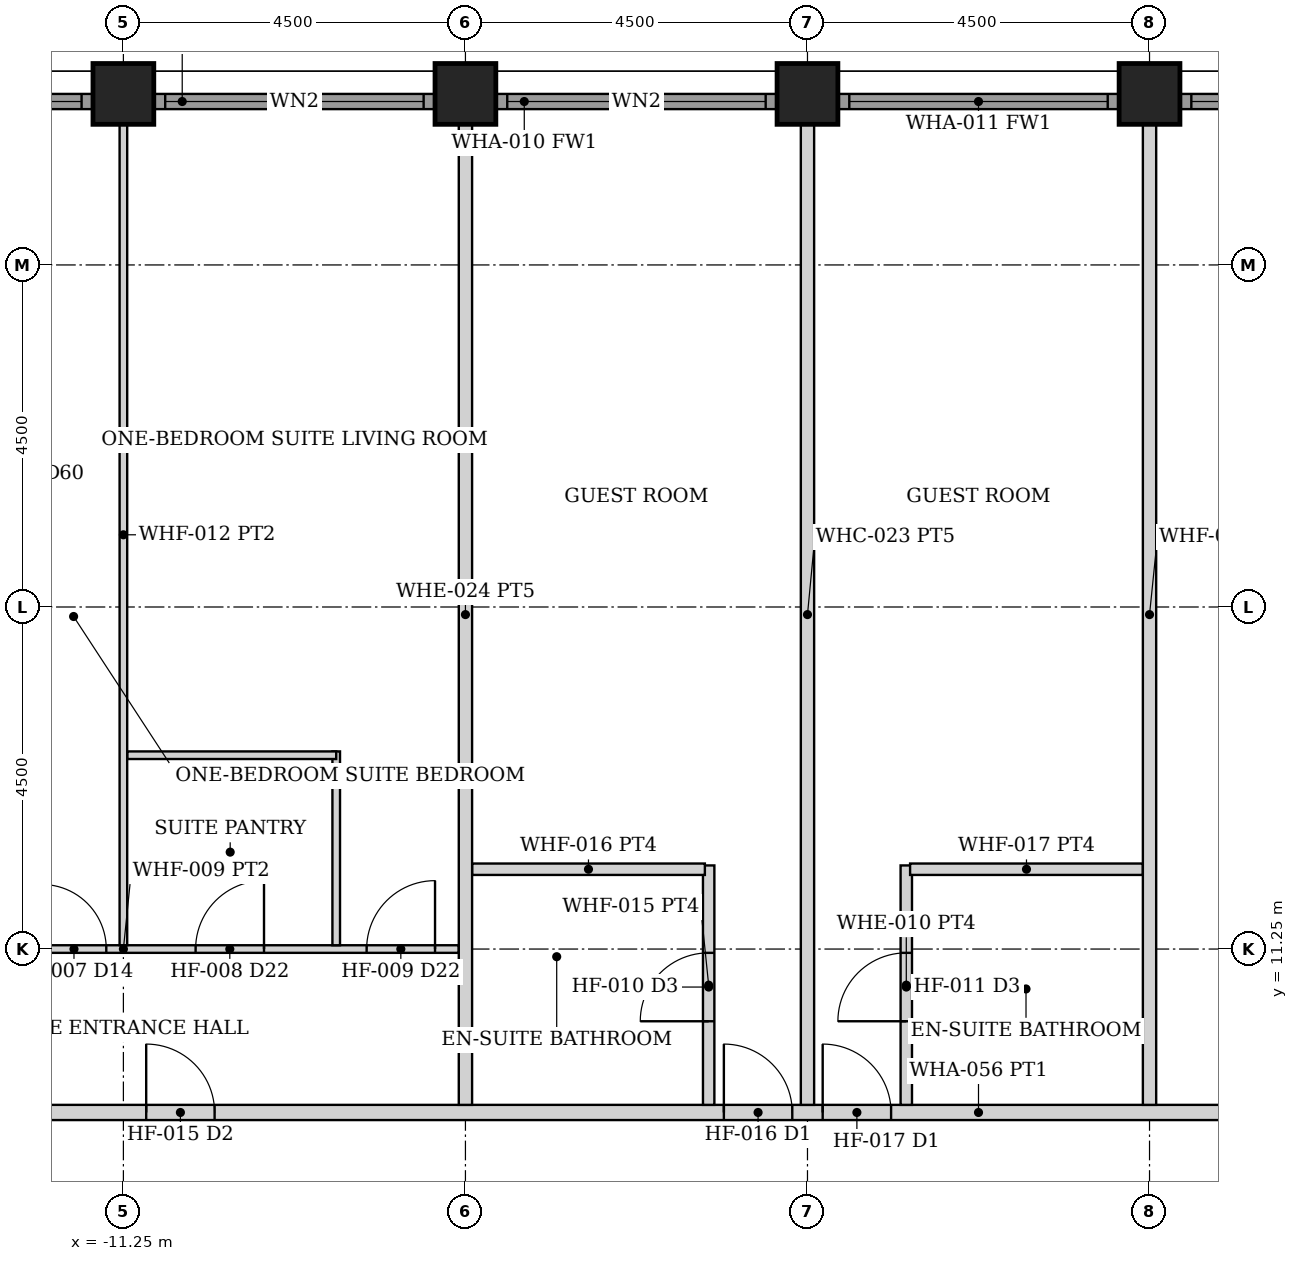
"""IFC4 building model, lengths in metres.
Left out: names, types, materials, properties, quantities, classifications, styles, units other than length and angle.
Written with IfcOpenShell. Run it as: python <this file> out.ifc"""

import sys

from ifc_helpers import new_model, si_unit, direction, frame, frame_2d, origin, origin_2d, place, context, subcontext, project, spatial, rectangle, hollow_rectangle, extrude, element, fill, save


model = new_model("IFC4")
c1 = context("Model", 3, precision=1e-05, world=origin(), true_north=direction((0.0, 1.0)))
c2 = subcontext(c1, "Body", "Model", "MODEL_VIEW")
j1 = project(units=[si_unit("LENGTHUNIT", "METRE"), si_unit("PLANEANGLEUNIT", "RADIAN")], contexts=[c1])
p1 = place(None, origin())
s1 = spatial("IfcSite", under=j1, at=p1, CompositionType="ELEMENT")
p2 = place(p1, origin())
s2 = spatial("IfcBuilding", under=s1, at=p2, CompositionType="ELEMENT")
p3 = place(p2, frame((0.0, 0.0, 172.4)))
s3 = spatial("IfcBuildingStorey", under=s2, at=p3, CompositionType="ELEMENT", Elevation=172.4)
for number, where, z_axis, x_axis in (
    (1, (-11.25, 22.5, 0.0), (0.0, 0.0, 1.0), (0.0, 1.0, 0.0)),
    (2, (-6.75, 22.5, 0.0), (0.0, 0.0, 1.0), (0.0, 1.0, 0.0)),
    (3, (-2.25, 22.5, 0.0), (0.0, 0.0, 1.0), (0.0, 1.0, 0.0)),
    (4, (2.25, 22.5, 0.0), (0.0, 0.0, 1.0), (0.0, 1.0, 0.0)),
):
    element("IfcColumn", number, at=place(p3, frame(where, z_axis=z_axis, x_axis=x_axis)), inside=s3, PredefinedType="COLUMN", context=c2, shape_type="SweptSolid", body=[
        extrude(hollow_rectangle(XDim=0.8, YDim=0.8, WallThickness=0.045, at=origin_2d()), origin(), (0.0, 0.0, 1.0), 3.6),
    ])
p4 = place(p3, frame((-15.345, 22.4, 0.0), z_axis=(0.0, 0.0, 1.0), x_axis=(1.0, 0.0, 0.0)))
e5 = element("IfcWall", 5, at=p4, inside=s3, PredefinedType="SOLIDWALL", context=c2, shape_type="SweptSolid", body=[
    extrude(rectangle(XDim=3.69, YDim=0.2, at=frame_2d((1.845, 0.0))), origin(), (0.0, 0.0, 1.0), 2.479),
])
p5 = place(p4, frame((0.145, 0.0, 0.3)))
e6 = element("IfcOpeningElement", 6, at=p5, cuts=e5, PredefinedType="OPENING", context=c2, shape_type="SweptSolid", body=[
    extrude(rectangle(XDim=3.4, YDim=2.029, at=frame_2d((1.7, 1.015))), frame((0.0, 0.11, 0.0), z_axis=(0.0, -1.0, 0.0), x_axis=(1.0, 0.0, 0.0)), (0.0, 0.0, 1.0), 0.22),
])
p6 = place(p3, frame((-10.845, 22.4, 0.0), z_axis=(0.0, 0.0, 1.0), x_axis=(1.0, 0.0, 0.0)))
e7 = element("IfcWall", 7, at=p6, inside=s3, PredefinedType="SOLIDWALL", context=c2, shape_type="SweptSolid", body=[
    extrude(rectangle(XDim=3.69, YDim=0.2, at=frame_2d((1.845, 0.0))), origin(), (0.0, 0.0, 1.0), 2.479),
])
p7 = place(p6, frame((0.145, 0.0, 0.3)))
e8 = element("IfcOpeningElement", 8, at=p7, cuts=e7, PredefinedType="OPENING", context=c2, shape_type="SweptSolid", body=[
    extrude(rectangle(XDim=3.4, YDim=2.029, at=frame_2d((1.7, 1.015))), frame((0.0, 0.11, 0.0), z_axis=(0.0, -1.0, 0.0), x_axis=(1.0, 0.0, 0.0)), (0.0, 0.0, 1.0), 0.22),
])
p8 = place(p3, frame((-6.345, 22.4, 0.0), z_axis=(0.0, 0.0, 1.0), x_axis=(1.0, 0.0, 0.0)))
e9 = element("IfcWall", 9, at=p8, inside=s3, PredefinedType="SOLIDWALL", context=c2, shape_type="SweptSolid", body=[
    extrude(rectangle(XDim=3.69, YDim=0.2, at=frame_2d((1.845, 0.0))), origin(), (0.0, 0.0, 1.0), 2.479),
])
p9 = place(p8, frame((0.145, 0.0, 0.3)))
e10 = element("IfcOpeningElement", 10, at=p9, cuts=e9, PredefinedType="OPENING", context=c2, shape_type="SweptSolid", body=[
    extrude(rectangle(XDim=3.4, YDim=2.029, at=frame_2d((1.7, 1.015))), frame((0.0, 0.11, 0.0), z_axis=(0.0, -1.0, 0.0), x_axis=(1.0, 0.0, 0.0)), (0.0, 0.0, 1.0), 0.22),
])
p10 = place(p3, frame((-1.845, 22.4, 0.0), z_axis=(0.0, 0.0, 1.0), x_axis=(1.0, 0.0, 0.0)))
e11 = element("IfcWall", 11, at=p10, inside=s3, PredefinedType="SOLIDWALL", context=c2, shape_type="SweptSolid", body=[
    extrude(rectangle(XDim=3.69, YDim=0.2, at=frame_2d((1.845, 0.0))), origin(), (0.0, 0.0, 1.0), 2.479),
])
p11 = place(p10, frame((0.145, 0.0, 0.3)))
e12 = element("IfcOpeningElement", 12, at=p11, cuts=e11, PredefinedType="OPENING", context=c2, shape_type="SweptSolid", body=[
    extrude(rectangle(XDim=3.4, YDim=2.029, at=frame_2d((1.7, 1.015))), frame((0.0, 0.11, 0.0), z_axis=(0.0, -1.0, 0.0), x_axis=(1.0, 0.0, 0.0)), (0.0, 0.0, 1.0), 0.22),
])
p12 = place(p3, frame((2.655, 22.4, 0.0), z_axis=(0.0, 0.0, 1.0), x_axis=(1.0, 0.0, 0.0)))
e13 = element("IfcWall", 13, at=p12, inside=s3, PredefinedType="SOLIDWALL", context=c2, shape_type="SweptSolid", body=[
    extrude(rectangle(XDim=3.69, YDim=0.2, at=frame_2d((1.845, 0.0))), origin(), (0.0, 0.0, 1.0), 2.479),
])
p13 = place(p12, frame((0.145, 0.0, 0.3)))
e14 = element("IfcOpeningElement", 14, at=p13, cuts=e13, PredefinedType="OPENING", context=c2, shape_type="SweptSolid", body=[
    extrude(rectangle(XDim=3.4, YDim=2.029, at=frame_2d((1.7, 1.015))), frame((0.0, 0.11, 0.0), z_axis=(0.0, -1.0, 0.0), x_axis=(1.0, 0.0, 0.0)), (0.0, 0.0, 1.0), 0.22),
])
p14 = place(p3, frame((-22.3, 9.1, 0.0), z_axis=(0.0, 0.0, 1.0), x_axis=(1.0, 0.0, 0.0)))
e15 = element("IfcWall", 15, at=p14, inside=s3, PredefinedType="PARTITIONING", context=c2, shape_type="SweptSolid", body=[
    extrude(rectangle(XDim=44.6, YDim=0.2, at=frame_2d((22.3, 0.0))), origin(), (0.0, 0.0, 1.0), 2.473),
])
p15 = place(p14, frame((11.35, 0.0, 0.0)))
e16 = element("IfcOpeningElement", 16, at=p15, cuts=e15, PredefinedType="OPENING", context=c2, shape_type="SweptSolid", body=[
    extrude(rectangle(XDim=0.9, YDim=2.1, at=frame_2d((0.45, 1.05))), frame((0.0, 0.11, 0.0), z_axis=(0.0, -1.0, 0.0), x_axis=(1.0, 0.0, 0.0)), (0.0, 0.0, 1.0), 0.22),
])
p16 = place(p14, frame((18.95, 0.0, 0.0)))
e17 = element("IfcOpeningElement", 17, at=p16, cuts=e15, PredefinedType="OPENING", context=c2, shape_type="SweptSolid", body=[
    extrude(rectangle(XDim=0.9, YDim=2.1, at=frame_2d((0.45, 1.05))), frame((0.0, 0.11, 0.0), z_axis=(0.0, -1.0, 0.0), x_axis=(1.0, 0.0, 0.0)), (0.0, 0.0, 1.0), 0.22),
])
p17 = place(p14, frame((20.25, 0.0, 0.0)))
e18 = element("IfcOpeningElement", 18, at=p17, cuts=e15, PredefinedType="OPENING", context=c2, shape_type="SweptSolid", body=[
    extrude(rectangle(XDim=0.9, YDim=2.1, at=frame_2d((0.45, 1.05))), frame((0.0, 0.11, 0.0), z_axis=(0.0, -1.0, 0.0), x_axis=(1.0, 0.0, 0.0)), (0.0, 0.0, 1.0), 0.22),
])
p18 = place(p14, frame((32.45, 0.0, 0.0)))
e19 = element("IfcOpeningElement", 19, at=p18, cuts=e15, PredefinedType="OPENING", context=c2, shape_type="SweptSolid", body=[
    extrude(rectangle(XDim=0.9, YDim=2.1, at=frame_2d((0.45, 1.05))), frame((0.0, 0.11, 0.0), z_axis=(0.0, -1.0, 0.0), x_axis=(1.0, 0.0, 0.0)), (0.0, 0.0, 1.0), 0.22),
])
p19 = place(p14, frame((36.95, 0.0, 0.0)))
e20 = element("IfcOpeningElement", 20, at=p19, cuts=e15, PredefinedType="OPENING", context=c2, shape_type="SweptSolid", body=[
    extrude(rectangle(XDim=0.9, YDim=2.1, at=frame_2d((0.45, 1.05))), frame((0.0, 0.11, 0.0), z_axis=(0.0, -1.0, 0.0), x_axis=(1.0, 0.0, 0.0)), (0.0, 0.0, 1.0), 0.22),
])
p20 = place(p14, frame((38.85, 0.0, 0.0)))
e21 = element("IfcOpeningElement", 21, at=p20, cuts=e15, PredefinedType="OPENING", context=c2, shape_type="SweptSolid", body=[
    extrude(rectangle(XDim=0.9, YDim=2.1, at=frame_2d((0.45, 1.05))), frame((0.0, 0.11, 0.0), z_axis=(0.0, -1.0, 0.0), x_axis=(1.0, 0.0, 0.0)), (0.0, 0.0, 1.0), 0.22),
])
p21 = place(p14, frame((4.85, 0.0, 0.0)))
e22 = element("IfcOpeningElement", 22, at=p21, cuts=e15, PredefinedType="OPENING", context=c2, shape_type="SweptSolid", body=[
    extrude(rectangle(XDim=0.9, YDim=2.1, at=frame_2d((0.45, 1.05))), frame((0.0, 0.11, 0.0), z_axis=(0.0, -1.0, 0.0), x_axis=(1.0, 0.0, 0.0)), (0.0, 0.0, 1.0), 0.22),
])
p22 = place(p3, frame((-15.663, 11.25, 0.0), z_axis=(0.0, 0.0, 1.0), x_axis=(1.0, 0.0, 0.0)))
e23 = element("IfcWall", 23, at=p22, inside=s3, PredefinedType="PARTITIONING", context=c2, shape_type="SweptSolid", body=[
    extrude(rectangle(XDim=8.825, YDim=0.1, at=frame_2d((4.413, 0.0))), origin(), (0.0, 0.0, 1.0), 2.473),
])
p23 = place(p22, frame((5.363, 0.0, 0.0)))
e24 = element("IfcOpeningElement", 24, at=p23, cuts=e23, PredefinedType="OPENING", context=c2, shape_type="SweptSolid", body=[
    extrude(rectangle(XDim=0.9, YDim=2.1, at=frame_2d((0.45, 1.05))), frame((0.0, 0.06, 0.0), z_axis=(0.0, -1.0, 0.0), x_axis=(1.0, 0.0, 0.0)), (0.0, 0.0, 1.0), 0.12),
])
p24 = place(p22, frame((7.613, 0.0, 0.0)))
e25 = element("IfcOpeningElement", 25, at=p24, cuts=e23, PredefinedType="OPENING", context=c2, shape_type="SweptSolid", body=[
    extrude(rectangle(XDim=0.9, YDim=2.1, at=frame_2d((0.45, 1.05))), frame((0.0, 0.06, 0.0), z_axis=(0.0, -1.0, 0.0), x_axis=(1.0, 0.0, 0.0)), (0.0, 0.0, 1.0), 0.12),
])
p25 = place(p22, frame((3.337, 0.0, 0.0)))
e26 = element("IfcOpeningElement", 26, at=p25, cuts=e23, PredefinedType="OPENING", context=c2, shape_type="SweptSolid", body=[
    extrude(rectangle(XDim=0.85, YDim=2.1, at=frame_2d((0.425, 1.05))), frame((0.0, 0.06, 0.0), z_axis=(0.0, -1.0, 0.0), x_axis=(1.0, 0.0, 0.0)), (0.0, 0.0, 1.0), 0.12),
])
p26 = place(p3, frame((-8.45, 11.3, 0.0), z_axis=(0.0, 0.0, 1.0), x_axis=(0.0, 1.0, 0.0)))
e27 = element("IfcWall", 27, at=p26, inside=s3, PredefinedType="PARTITIONING", context=c2, shape_type="SweptSolid", body=[
    extrude(rectangle(XDim=2.55, YDim=0.1, at=frame_2d((1.275, 0.0))), origin(), (0.0, 0.0, 1.0), 2.473),
])
p27 = place(p3, frame((-11.2, 13.8, 0.0), z_axis=(0.0, 0.0, 1.0), x_axis=(1.0, 0.0, 0.0)))
e28 = element("IfcWall", 28, at=p27, inside=s3, PredefinedType="PARTITIONING", context=c2, shape_type="SweptSolid", body=[
    extrude(rectangle(XDim=2.75, YDim=0.1, at=frame_2d((1.375, 0.0))), origin(), (0.0, 0.0, 1.0), 2.473),
])
p28 = place(p3, frame((-11.25, 11.3, 0.0), z_axis=(0.0, 0.0, 1.0), x_axis=(0.0, 1.0, 0.0)))
e29 = element("IfcWall", 29, at=p28, inside=s3, PredefinedType="PARTITIONING", context=c2, shape_type="SweptSolid", body=[
    extrude(rectangle(XDim=10.8, YDim=0.1, at=frame_2d((5.4, 0.0))), origin(), (0.0, 0.0, 1.0), 2.473),
])
p29 = place(p3, frame((-3.55, 9.2, 0.0), z_axis=(0.0, 0.0, 1.0), x_axis=(0.0, 1.0, 0.0)))
e30 = element("IfcWall", 30, at=p29, inside=s3, PredefinedType="PARTITIONING", context=c2, shape_type="SweptSolid", body=[
    extrude(rectangle(XDim=3.15, YDim=0.15, at=frame_2d((1.575, 0.0))), origin(), (0.0, 0.0, 1.0), 2.473),
])
p30 = place(p29, frame((1.1, 0.0, 0.0)))
e31 = element("IfcOpeningElement", 31, at=p30, cuts=e30, PredefinedType="OPENING", context=c2, shape_type="SweptSolid", body=[
    extrude(rectangle(XDim=0.9, YDim=2.1, at=frame_2d((0.45, 1.05))), frame((0.0, 0.085, 0.0), z_axis=(0.0, -1.0, 0.0), x_axis=(1.0, 0.0, 0.0)), (0.0, 0.0, 1.0), 0.17),
])
p31 = place(p3, frame((-6.663, 12.3, 0.0), z_axis=(0.0, 0.0, 1.0), x_axis=(1.0, 0.0, 0.0)))
e32 = element("IfcWall", 32, at=p31, inside=s3, PredefinedType="PARTITIONING", context=c2, shape_type="SweptSolid", body=[
    extrude(rectangle(XDim=3.062, YDim=0.15, at=frame_2d((1.531, 0.0))), origin(), (0.0, 0.0, 1.0), 2.473),
])
p32 = place(p3, frame((-0.95, 9.2, 0.0), z_axis=(0.0, 0.0, 1.0), x_axis=(0.0, 1.0, 0.0)))
e33 = element("IfcWall", 33, at=p32, inside=s3, PredefinedType="PARTITIONING", context=c2, shape_type="SweptSolid", body=[
    extrude(rectangle(XDim=3.15, YDim=0.15, at=frame_2d((1.575, 0.0))), origin(), (0.0, 0.0, 1.0), 2.473),
])
p33 = place(p32, frame((1.1, 0.0, 0.0)))
e34 = element("IfcOpeningElement", 34, at=p33, cuts=e33, PredefinedType="OPENING", context=c2, shape_type="SweptSolid", body=[
    extrude(rectangle(XDim=0.9, YDim=2.1, at=frame_2d((0.45, 1.05))), frame((0.0, 0.085, 0.0), z_axis=(0.0, -1.0, 0.0), x_axis=(1.0, 0.0, 0.0)), (0.0, 0.0, 1.0), 0.17),
])
p34 = place(p3, frame((-0.9, 12.3, 0.0), z_axis=(0.0, 0.0, 1.0), x_axis=(1.0, 0.0, 0.0)))
e35 = element("IfcWall", 35, at=p34, inside=s3, PredefinedType="PARTITIONING", context=c2, shape_type="SweptSolid", body=[
    extrude(rectangle(XDim=3.062, YDim=0.15, at=frame_2d((1.531, 0.0))), origin(), (0.0, 0.0, 1.0), 2.473),
])
for number, where, z_axis, x_axis in (
    (36, (-6.75, 9.2, 0.0), (0.0, 0.0, 1.0), (0.0, 1.0, 0.0)),
    (37, (-2.25, 9.2, 0.0), (0.0, 0.0, 1.0), (0.0, 1.0, 0.0)),
    (38, (2.25, 9.2, 0.0), (0.0, 0.0, 1.0), (0.0, 1.0, 0.0)),
):
    element("IfcWall", number, at=place(p3, frame(where, z_axis=z_axis, x_axis=x_axis)), inside=s3, PredefinedType="PARTITIONING", context=c2, shape_type="SweptSolid", body=[
        extrude(rectangle(XDim=12.9, YDim=0.175, at=frame_2d((6.45, 0.0))), origin(), (0.0, 0.0, 1.0), 2.473),
    ])
p35 = place(p5, origin())
e39 = element("IfcWindow", 39, at=p35, inside=s3, PartitioningType="SINGLE_PANEL", PredefinedType="WINDOW", context=c2, shape_type="SweptSolid", body=[
    extrude(rectangle(XDim=3.4, YDim=2.029, at=frame_2d((1.7, 1.015))), frame((0.0, 0.03, 0.0), z_axis=(0.0, -1.0, 0.0), x_axis=(1.0, 0.0, 0.0)), (0.0, 0.0, 1.0), 0.06),
])
fill(e6, e39)
p36 = place(p7, origin())
e40 = element("IfcWindow", 40, at=p36, inside=s3, PartitioningType="SINGLE_PANEL", PredefinedType="WINDOW", context=c2, shape_type="SweptSolid", body=[
    extrude(rectangle(XDim=3.4, YDim=2.029, at=frame_2d((1.7, 1.015))), frame((0.0, 0.03, 0.0), z_axis=(0.0, -1.0, 0.0), x_axis=(1.0, 0.0, 0.0)), (0.0, 0.0, 1.0), 0.06),
])
fill(e8, e40)
p37 = place(p9, origin())
e41 = element("IfcWindow", 41, at=p37, inside=s3, PartitioningType="SINGLE_PANEL", PredefinedType="WINDOW", context=c2, shape_type="SweptSolid", body=[
    extrude(rectangle(XDim=3.4, YDim=2.029, at=frame_2d((1.7, 1.015))), frame((0.0, 0.03, 0.0), z_axis=(0.0, -1.0, 0.0), x_axis=(1.0, 0.0, 0.0)), (0.0, 0.0, 1.0), 0.06),
])
fill(e10, e41)
p38 = place(p11, origin())
e42 = element("IfcWindow", 42, at=p38, inside=s3, PartitioningType="SINGLE_PANEL", PredefinedType="WINDOW", context=c2, shape_type="SweptSolid", body=[
    extrude(rectangle(XDim=3.4, YDim=2.029, at=frame_2d((1.7, 1.015))), frame((0.0, 0.03, 0.0), z_axis=(0.0, -1.0, 0.0), x_axis=(1.0, 0.0, 0.0)), (0.0, 0.0, 1.0), 0.06),
])
fill(e12, e42)
p39 = place(p13, origin())
e43 = element("IfcWindow", 43, at=p39, inside=s3, PartitioningType="SINGLE_PANEL", PredefinedType="WINDOW", context=c2, shape_type="SweptSolid", body=[
    extrude(rectangle(XDim=3.4, YDim=2.029, at=frame_2d((1.7, 1.015))), frame((0.0, 0.03, 0.0), z_axis=(0.0, -1.0, 0.0), x_axis=(1.0, 0.0, 0.0)), (0.0, 0.0, 1.0), 0.06),
])
fill(e14, e43)
p40 = place(p15, origin())
e44 = element("IfcDoor", 44, at=p40, inside=s3, OperationType="SINGLE_SWING_LEFT", PredefinedType="DOOR", context=c2, shape_type="SweptSolid", body=[
    extrude(rectangle(XDim=0.9, YDim=2.1, at=frame_2d((0.45, 1.05))), frame((0.0, 0.025, 0.0), z_axis=(0.0, -1.0, 0.0), x_axis=(1.0, 0.0, 0.0)), (0.0, 0.0, 1.0), 0.05),
])
fill(e16, e44)
p41 = place(p23, origin())
e45 = element("IfcDoor", 45, at=p41, inside=s3, OperationType="SINGLE_SWING_RIGHT", PredefinedType="DOOR", context=c2, shape_type="SweptSolid", body=[
    extrude(rectangle(XDim=0.9, YDim=2.1, at=frame_2d((0.45, 1.05))), frame((0.0, 0.025, 0.0), z_axis=(0.0, -1.0, 0.0), x_axis=(1.0, 0.0, 0.0)), (0.0, 0.0, 1.0), 0.05),
])
fill(e24, e45)
p42 = place(p24, origin())
e46 = element("IfcDoor", 46, at=p42, inside=s3, OperationType="SINGLE_SWING_RIGHT", PredefinedType="DOOR", context=c2, shape_type="SweptSolid", body=[
    extrude(rectangle(XDim=0.9, YDim=2.1, at=frame_2d((0.45, 1.05))), frame((0.0, 0.025, 0.0), z_axis=(0.0, -1.0, 0.0), x_axis=(1.0, 0.0, 0.0)), (0.0, 0.0, 1.0), 0.05),
])
fill(e25, e46)
p43 = place(p25, origin())
e47 = element("IfcDoor", 47, at=p43, inside=s3, OperationType="SINGLE_SWING_LEFT", PredefinedType="DOOR", context=c2, shape_type="SweptSolid", body=[
    extrude(rectangle(XDim=0.85, YDim=2.1, at=frame_2d((0.425, 1.05))), frame((0.0, 0.025, 0.0), z_axis=(0.0, -1.0, 0.0), x_axis=(1.0, 0.0, 0.0)), (0.0, 0.0, 1.0), 0.05),
])
fill(e26, e47)
p44 = place(p16, origin())
e48 = element("IfcDoor", 48, at=p44, inside=s3, OperationType="SINGLE_SWING_LEFT", PredefinedType="DOOR", context=c2, shape_type="SweptSolid", body=[
    extrude(rectangle(XDim=0.9, YDim=2.1, at=frame_2d((0.45, 1.05))), frame((0.0, 0.025, 0.0), z_axis=(0.0, -1.0, 0.0), x_axis=(1.0, 0.0, 0.0)), (0.0, 0.0, 1.0), 0.05),
])
fill(e17, e48)
p45 = place(p30, origin())
e49 = element("IfcDoor", 49, at=p45, inside=s3, OperationType="SINGLE_SWING_LEFT", PredefinedType="DOOR", context=c2, shape_type="SweptSolid", body=[
    extrude(rectangle(XDim=0.9, YDim=2.1, at=frame_2d((0.45, 1.05))), frame((0.0, 0.025, 0.0), z_axis=(0.0, -1.0, 0.0), x_axis=(1.0, 0.0, 0.0)), (0.0, 0.0, 1.0), 0.05),
])
fill(e31, e49)
p46 = place(p17, origin())
e50 = element("IfcDoor", 50, at=p46, inside=s3, OperationType="SINGLE_SWING_LEFT", PredefinedType="DOOR", context=c2, shape_type="SweptSolid", body=[
    extrude(rectangle(XDim=0.9, YDim=2.1, at=frame_2d((0.45, 1.05))), frame((0.0, 0.025, 0.0), z_axis=(0.0, -1.0, 0.0), x_axis=(1.0, 0.0, 0.0)), (0.0, 0.0, 1.0), 0.05),
])
fill(e18, e50)
p47 = place(p33, origin())
e51 = element("IfcDoor", 51, at=p47, inside=s3, OperationType="SINGLE_SWING_LEFT", PredefinedType="DOOR", context=c2, shape_type="SweptSolid", body=[
    extrude(rectangle(XDim=0.9, YDim=2.1, at=frame_2d((0.45, 1.05))), frame((0.0, 0.025, 0.0), z_axis=(0.0, -1.0, 0.0), x_axis=(1.0, 0.0, 0.0)), (0.0, 0.0, 1.0), 0.05),
])
fill(e34, e51)
save(model, sys.argv[1])
